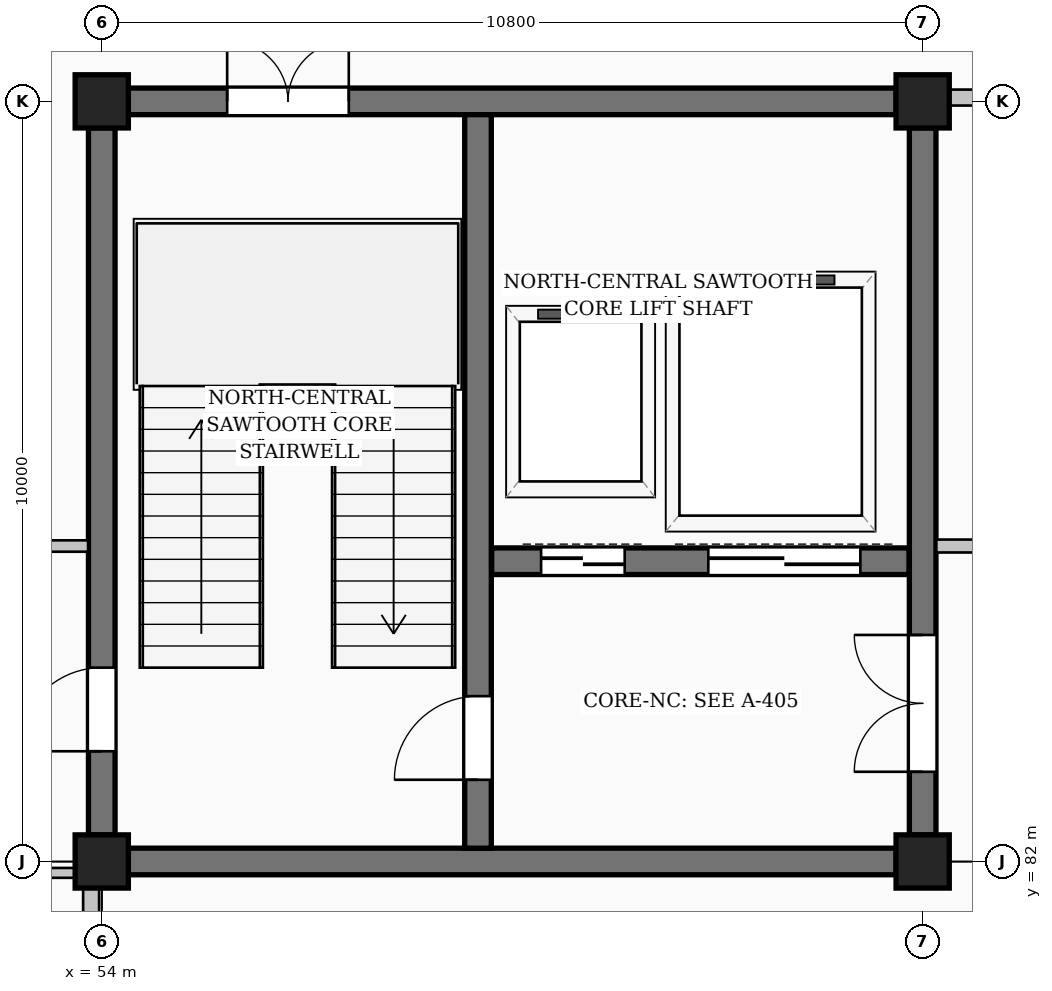
"""IFC4 building model, lengths in metres.
Left out: names, types, materials, properties, quantities, classifications, styles, units other than length and angle.
Written with IfcOpenShell. Run it as: python <this file> out.ifc"""

import sys

from ifc_helpers import new_model, si_unit, direction, frame, frame_2d, origin, origin_2d, place, context, subcontext, project, spatial, rectangle, extrude, element, fill, save


model = new_model("IFC4")
c1 = context("Model", 3, precision=1e-05, world=origin(), true_north=direction((0.0, 1.0)))
c2 = subcontext(c1, "Body", "Model", "MODEL_VIEW")
j1 = project(units=[si_unit("LENGTHUNIT", "METRE"), si_unit("PLANEANGLEUNIT", "RADIAN")], contexts=[c1])
p1 = place(None, origin())
s1 = spatial("IfcSite", under=j1, at=p1, CompositionType="ELEMENT")
p2 = place(p1, origin())
s2 = spatial("IfcBuilding", under=s1, at=p2, CompositionType="ELEMENT")
p3 = place(p2, origin())
s3 = spatial("IfcBuildingStorey", under=s2, at=p3, CompositionType="ELEMENT", Elevation=0.0)
for number, where, z_axis, x_axis in (
    (1, (54.0, 82.0, 0.0), (0.0, 0.0, 1.0), (1.0, 0.0, 0.0)),
    (2, (54.0, 92.0, 0.0), (0.0, 0.0, 1.0), (1.0, 0.0, 0.0)),
    (3, (64.8, 82.0, 0.0), (0.0, 0.0, 1.0), (1.0, 0.0, 0.0)),
    (4, (64.8, 92.0, 0.0), (0.0, 0.0, 1.0), (1.0, 0.0, 0.0)),
):
    element("IfcColumn", number, at=place(p3, frame(where, z_axis=z_axis, x_axis=x_axis)), inside=s3, PredefinedType="COLUMN", context=c2, shape_type="SweptSolid", body=[
        extrude(rectangle(XDim=0.7, YDim=0.7, at=origin_2d()), origin(), (0.0, 0.0, 1.0), 4.8),
    ])
p4 = place(p3, frame((54.35, 82.0, 0.0), z_axis=(0.0, 0.0, 1.0), x_axis=(1.0, 0.0, 0.0)))
e5 = element("IfcWall", 5, at=p4, inside=s3, PredefinedType="SHEAR", context=c2, shape_type="SweptSolid", body=[
    extrude(rectangle(XDim=10.1, YDim=0.35, at=frame_2d((5.05, 0.0))), origin(), (0.0, 0.0, 1.0), 4.56),
])
p5 = place(p3, frame((54.35, 92.0, 0.0), z_axis=(0.0, 0.0, 1.0), x_axis=(1.0, 0.0, 0.0)))
e6 = element("IfcWall", 6, at=p5, inside=s3, PredefinedType="SHEAR", context=c2, shape_type="SweptSolid", body=[
    extrude(rectangle(XDim=10.1, YDim=0.35, at=frame_2d((5.05, 0.0))), origin(), (0.0, 0.0, 1.0), 4.56),
])
p6 = place(p5, frame((1.3, 0.0, 0.0)))
e7 = element("IfcOpeningElement", 7, at=p6, cuts=e6, PredefinedType="OPENING", context=c2, shape_type="SweptSolid", body=[
    extrude(rectangle(XDim=1.6, YDim=2.2, at=frame_2d((0.8, 1.1))), frame((0.0, 0.185, 0.0), z_axis=(0.0, -1.0, 0.0), x_axis=(1.0, 0.0, 0.0)), (0.0, 0.0, 1.0), 0.37),
])
p7 = place(p3, frame((54.0, 82.35, 0.0), z_axis=(0.0, 0.0, 1.0), x_axis=(0.0, 1.0, 0.0)))
e8 = element("IfcWall", 8, at=p7, inside=s3, PredefinedType="SHEAR", context=c2, shape_type="SweptSolid", body=[
    extrude(rectangle(XDim=9.3, YDim=0.35, at=frame_2d((4.65, 0.0))), origin(), (0.0, 0.0, 1.0), 4.56),
])
p8 = place(p7, frame((1.1, 0.0, 0.0)))
e9 = element("IfcOpeningElement", 9, at=p8, cuts=e8, PredefinedType="OPENING", context=c2, shape_type="SweptSolid", body=[
    extrude(rectangle(XDim=1.1, YDim=2.2, at=frame_2d((0.55, 1.1))), frame((0.0, 0.185, 0.0), z_axis=(0.0, -1.0, 0.0), x_axis=(1.0, 0.0, 0.0)), (0.0, 0.0, 1.0), 0.37),
])
p9 = place(p3, frame((64.8, 82.35, 0.0), z_axis=(0.0, 0.0, 1.0), x_axis=(0.0, 1.0, 0.0)))
e10 = element("IfcWall", 10, at=p9, inside=s3, PredefinedType="SHEAR", context=c2, shape_type="SweptSolid", body=[
    extrude(rectangle(XDim=9.3, YDim=0.35, at=frame_2d((4.65, 0.0))), origin(), (0.0, 0.0, 1.0), 4.56),
])
p10 = place(p9, frame((0.83, 0.0, 0.0)))
e11 = element("IfcOpeningElement", 11, at=p10, cuts=e10, PredefinedType="OPENING", context=c2, shape_type="SweptSolid", body=[
    extrude(rectangle(XDim=1.8, YDim=2.25, at=frame_2d((0.9, 1.125))), frame((0.0, 0.185, 0.0), z_axis=(0.0, -1.0, 0.0), x_axis=(1.0, 0.0, 0.0)), (0.0, 0.0, 1.0), 0.37),
])
p11 = place(p3, frame((58.95, 82.175, 0.0), z_axis=(0.0, 0.0, 1.0), x_axis=(0.0, 1.0, 0.0)))
e12 = element("IfcWall", 12, at=p11, inside=s3, PredefinedType="SHEAR", context=c2, shape_type="SweptSolid", body=[
    extrude(rectangle(XDim=9.65, YDim=0.35, at=frame_2d((4.825, 0.0))), origin(), (0.0, 0.0, 1.0), 4.56),
])
p12 = place(p11, frame((0.9, 0.0, 0.0)))
e13 = element("IfcOpeningElement", 13, at=p12, cuts=e12, PredefinedType="OPENING", context=c2, shape_type="SweptSolid", body=[
    extrude(rectangle(XDim=1.1, YDim=2.2, at=frame_2d((0.55, 1.1))), frame((0.0, 0.185, 0.0), z_axis=(0.0, -1.0, 0.0), x_axis=(1.0, 0.0, 0.0)), (0.0, 0.0, 1.0), 0.37),
])
p13 = place(p3, frame((59.13, 85.95, 0.0), z_axis=(0.0, 0.0, 1.0), x_axis=(1.0, 0.0, 0.0)))
e14 = element("IfcWall", 14, at=p13, inside=s3, PredefinedType="SHEAR", context=c2, shape_type="SweptSolid", body=[
    extrude(rectangle(XDim=5.49, YDim=0.35, at=frame_2d((2.745, 0.0))), origin(), (0.0, 0.0, 1.0), 4.56),
])
p14 = place(p13, frame((0.65, 0.0, 0.0)))
e15 = element("IfcOpeningElement", 15, at=p14, cuts=e14, PredefinedType="OPENING", context=c2, shape_type="SweptSolid", body=[
    extrude(rectangle(XDim=1.1, YDim=2.2, at=frame_2d((0.55, 1.1))), frame((0.0, 0.185, 0.0), z_axis=(0.0, -1.0, 0.0), x_axis=(1.0, 0.0, 0.0)), (0.0, 0.0, 1.0), 0.37),
])
p15 = place(p13, frame((2.85, 0.0, 0.0)))
e16 = element("IfcOpeningElement", 16, at=p15, cuts=e14, PredefinedType="OPENING", context=c2, shape_type="SweptSolid", body=[
    extrude(rectangle(XDim=2.0, YDim=2.5, at=frame_2d((1.0, 1.25))), frame((0.0, 0.185, 0.0), z_axis=(0.0, -1.0, 0.0), x_axis=(1.0, 0.0, 0.0)), (0.0, 0.0, 1.0), 0.37),
])
p16 = place(p3, frame((43.38, 81.85, 0.0), z_axis=(0.0, 0.0, 1.0), x_axis=(1.0, 0.0, 0.0)))
e17 = element("IfcWall", 17, at=p16, inside=s3, PredefinedType="PARTITIONING", context=c2, shape_type="SweptSolid", body=[
    extrude(rectangle(XDim=10.44, YDim=0.13, at=frame_2d((5.22, 0.0))), origin(), (0.0, 0.0, 1.0), 3.989),
])
p17 = place(p16, frame((4.395, 0.0, 0.0)))
e18 = element("IfcOpeningElement", 18, at=p17, cuts=e17, PredefinedType="OPENING", context=c2, shape_type="SweptSolid", body=[
    extrude(rectangle(XDim=1.65, YDim=2.4, at=frame_2d((0.825, 1.2))), frame((0.0, 0.075, 0.0), z_axis=(0.0, -1.0, 0.0), x_axis=(1.0, 0.0, 0.0)), (0.0, 0.0, 1.0), 0.15),
])
p18 = place(p3, frame((25.6, 86.15, 0.0), z_axis=(0.0, 0.0, 1.0), x_axis=(1.0, 0.0, 0.0)))
e19 = element("IfcWall", 19, at=p18, inside=s3, PredefinedType="PARTITIONING", context=c2, shape_type="SweptSolid", body=[
    extrude(rectangle(XDim=28.22, YDim=0.15, at=frame_2d((14.11, 0.0))), origin(), (0.0, 0.0, 1.0), 4.52),
])
p19 = place(p18, frame((13.235, 0.0, 0.0)))
e20 = element("IfcOpeningElement", 20, at=p19, cuts=e19, PredefinedType="OPENING", context=c2, shape_type="SweptSolid", body=[
    extrude(rectangle(XDim=1.75, YDim=2.45, at=frame_2d((0.875, 1.225))), frame((0.0, 0.085, 0.0), z_axis=(0.0, -1.0, 0.0), x_axis=(1.0, 0.0, 0.0)), (0.0, 0.0, 1.0), 0.17),
])
p20 = place(p3, frame((64.98, 86.15, 0.0), z_axis=(0.0, 0.0, 1.0), x_axis=(1.0, 0.0, 0.0)))
e21 = element("IfcWall", 21, at=p20, inside=s3, PredefinedType="PARTITIONING", context=c2, shape_type="SweptSolid", body=[
    extrude(rectangle(XDim=42.84, YDim=0.17, at=frame_2d((21.42, 0.0))), origin(), (0.0, 0.0, 1.0), 4.52),
])
p21 = place(p20, frame((20.495, 0.0, 0.0)))
e22 = element("IfcOpeningElement", 22, at=p21, cuts=e21, PredefinedType="OPENING", context=c2, shape_type="SweptSolid", body=[
    extrude(rectangle(XDim=1.85, YDim=2.45, at=frame_2d((0.925, 1.225))), frame((0.0, 0.095, 0.0), z_axis=(0.0, -1.0, 0.0), x_axis=(1.0, 0.0, 0.0)), (0.0, 0.0, 1.0), 0.19),
])
p22 = place(p3, frame((64.98, 92.05, 0.0), z_axis=(0.0, 0.0, 1.0), x_axis=(1.0, 0.0, 0.0)))
e23 = element("IfcWall", 23, at=p22, inside=s3, PredefinedType="PARTITIONING", context=c2, shape_type="SweptSolid", body=[
    extrude(rectangle(XDim=10.42, YDim=0.21, at=frame_2d((5.21, 0.0))), origin(), (0.0, 0.0, 1.0), 4.069),
])
p23 = place(p22, frame((4.185, 0.0, 0.0)))
e24 = element("IfcOpeningElement", 24, at=p23, cuts=e23, PredefinedType="OPENING", context=c2, shape_type="SweptSolid", body=[
    extrude(rectangle(XDim=2.05, YDim=2.55, at=frame_2d((1.025, 1.275))), frame((0.0, 0.115, 0.0), z_axis=(0.0, -1.0, 0.0), x_axis=(1.0, 0.0, 0.0)), (0.0, 0.0, 1.0), 0.23),
])
p24 = place(p3, frame((53.86, 72.2, 0.0), z_axis=(0.0, 0.0, 1.0), x_axis=(0.0, 1.0, 0.0)))
e25 = element("IfcWall", 25, at=p24, inside=s3, PredefinedType="PARTITIONING", context=c2, shape_type="SweptSolid", body=[
    extrude(rectangle(XDim=9.62, YDim=0.21, at=frame_2d((4.81, 0.0))), origin(), (0.0, 0.0, 1.0), 4.52),
])
p25 = place(p12, origin())
e26 = element("IfcDoor", 26, at=p25, inside=s3, OperationType="SINGLE_SWING_LEFT", PredefinedType="DOOR", context=c2, shape_type="SweptSolid", body=[
    extrude(rectangle(XDim=1.1, YDim=2.2, at=frame_2d((0.55, 1.1))), frame((0.0, 0.025, 0.0), z_axis=(0.0, -1.0, 0.0), x_axis=(1.0, 0.0, 0.0)), (0.0, 0.0, 1.0), 0.05),
])
fill(e13, e26)
p26 = place(p10, origin())
e27 = element("IfcDoor", 27, at=p26, inside=s3, OperationType="DOUBLE_DOOR_SINGLE_SWING", PredefinedType="DOOR", context=c2, shape_type="SweptSolid", body=[
    extrude(rectangle(XDim=1.8, YDim=2.25, at=frame_2d((0.9, 1.125))), frame((0.0, 0.025, 0.0), z_axis=(0.0, -1.0, 0.0), x_axis=(1.0, 0.0, 0.0)), (0.0, 0.0, 1.0), 0.05),
])
fill(e11, e27)
p27 = place(p6, origin())
e28 = element("IfcDoor", 28, at=p27, inside=s3, OperationType="DOUBLE_DOOR_SINGLE_SWING", PredefinedType="DOOR", context=c2, shape_type="SweptSolid", body=[
    extrude(rectangle(XDim=1.6, YDim=2.2, at=frame_2d((0.8, 1.1))), frame((0.0, 0.025, 0.0), z_axis=(0.0, -1.0, 0.0), x_axis=(1.0, 0.0, 0.0)), (0.0, 0.0, 1.0), 0.05),
])
fill(e7, e28)
p28 = place(p14, origin())
e29 = element("IfcDoor", 29, at=p28, inside=s3, OperationType="DOUBLE_DOOR_SLIDING", PredefinedType="DOOR", context=c2, shape_type="SweptSolid", body=[
    extrude(rectangle(XDim=1.1, YDim=2.2, at=frame_2d((0.55, 1.1))), frame((0.0, 0.025, 0.0), z_axis=(0.0, -1.0, 0.0), x_axis=(1.0, 0.0, 0.0)), (0.0, 0.0, 1.0), 0.05),
])
fill(e15, e29)
p29 = place(p15, origin())
e30 = element("IfcDoor", 30, at=p29, inside=s3, OperationType="DOUBLE_DOOR_SLIDING", PredefinedType="DOOR", context=c2, shape_type="SweptSolid", body=[
    extrude(rectangle(XDim=2.0, YDim=2.5, at=frame_2d((1.0, 1.25))), frame((0.0, 0.025, 0.0), z_axis=(0.0, -1.0, 0.0), x_axis=(1.0, 0.0, 0.0)), (0.0, 0.0, 1.0), 0.05),
])
fill(e16, e30)
p30 = place(p8, origin())
e31 = element("IfcDoor", 31, at=p30, inside=s3, OperationType="SINGLE_SWING_LEFT", PredefinedType="DOOR", context=c2, shape_type="SweptSolid", body=[
    extrude(rectangle(XDim=1.1, YDim=2.2, at=frame_2d((0.55, 1.1))), frame((0.0, 0.025, 0.0), z_axis=(0.0, -1.0, 0.0), x_axis=(1.0, 0.0, 0.0)), (0.0, 0.0, 1.0), 0.05),
])
fill(e9, e31)
save(model, sys.argv[1])
